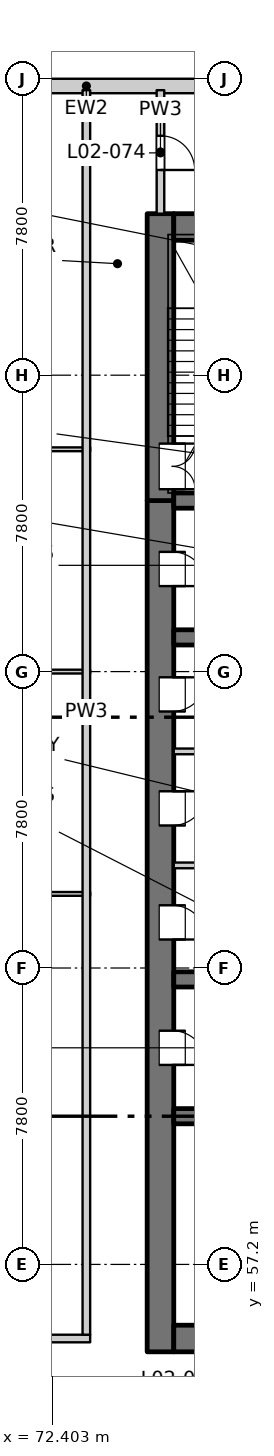
"""IFC4 building model, lengths in metres.
Left out: names, types, materials, properties, quantities, classifications, styles, units other than length and angle.
Written with IfcOpenShell. Run it as: python <this file> out.ifc"""

import sys

from ifc_helpers import new_model, si_unit, direction, frame, frame_2d, origin, place, context, subcontext, project, spatial, rectangle, extrude, element, fill, save


model = new_model("IFC4")
c1 = context("Model", 3, precision=1e-05, world=origin(), true_north=direction((0.0, 1.0)))
c2 = subcontext(c1, "Body", "Model", "MODEL_VIEW")
j1 = project(units=[si_unit("LENGTHUNIT", "METRE"), si_unit("PLANEANGLEUNIT", "RADIAN")], contexts=[c1])
p1 = place(None, origin())
s1 = spatial("IfcSite", under=j1, at=p1, CompositionType="ELEMENT")
p2 = place(p1, origin())
s2 = spatial("IfcBuilding", under=s1, at=p2, CompositionType="ELEMENT")
p3 = place(p2, frame((0.0, 0.0, 10.5)))
s3 = spatial("IfcBuildingStorey", under=s2, at=p3, CompositionType="ELEMENT", Elevation=10.5)
p4 = place(p3, frame((75.25, 54.9, -0.3), z_axis=(0.0, 0.0, 1.0), x_axis=(0.0, 1.0, 0.0)))
e1 = element("IfcWall", 1, at=p4, inside=s3, PredefinedType="SOLIDWALL", context=c2, shape_type="SweptSolid", body=[
    extrude(rectangle(XDim=22.4, YDim=0.7, at=frame_2d((11.2, 0.0))), origin(), (0.0, 0.0, 1.0), 4.45),
])
p5 = place(p4, frame((7.55, 0.0, 0.3)))
e2 = element("IfcOpeningElement", 2, at=p5, cuts=e1, PredefinedType="OPENING", context=c2, shape_type="SweptSolid", body=[
    extrude(rectangle(XDim=0.9, YDim=2.1, at=frame_2d((0.45, 1.05))), frame((0.0, 0.36, 0.0), z_axis=(0.0, -1.0, 0.0), x_axis=(1.0, 0.0, 0.0)), (0.0, 0.0, 1.0), 0.72),
])
p6 = place(p4, frame((10.85, 0.0, 0.3)))
e3 = element("IfcOpeningElement", 3, at=p6, cuts=e1, PredefinedType="OPENING", context=c2, shape_type="SweptSolid", body=[
    extrude(rectangle(XDim=0.9, YDim=2.1, at=frame_2d((0.45, 1.05))), frame((0.0, 0.36, 0.0), z_axis=(0.0, -1.0, 0.0), x_axis=(1.0, 0.0, 0.0)), (0.0, 0.0, 1.0), 0.72),
])
p7 = place(p4, frame((13.85, 0.0, 0.3)))
e4 = element("IfcOpeningElement", 4, at=p7, cuts=e1, PredefinedType="OPENING", context=c2, shape_type="SweptSolid", body=[
    extrude(rectangle(XDim=0.9, YDim=2.1, at=frame_2d((0.45, 1.05))), frame((0.0, 0.36, 0.0), z_axis=(0.0, -1.0, 0.0), x_axis=(1.0, 0.0, 0.0)), (0.0, 0.0, 1.0), 0.72),
])
p8 = place(p4, frame((16.85, 0.0, 0.3)))
e5 = element("IfcOpeningElement", 5, at=p8, cuts=e1, PredefinedType="OPENING", context=c2, shape_type="SweptSolid", body=[
    extrude(rectangle(XDim=0.9, YDim=2.1, at=frame_2d((0.45, 1.05))), frame((0.0, 0.36, 0.0), z_axis=(0.0, -1.0, 0.0), x_axis=(1.0, 0.0, 0.0)), (0.0, 0.0, 1.0), 0.72),
])
p9 = place(p4, frame((20.15, 0.0, 0.3)))
e6 = element("IfcOpeningElement", 6, at=p9, cuts=e1, PredefinedType="OPENING", context=c2, shape_type="SweptSolid", body=[
    extrude(rectangle(XDim=0.9, YDim=2.1, at=frame_2d((0.45, 1.05))), frame((0.0, 0.36, 0.0), z_axis=(0.0, -1.0, 0.0), x_axis=(1.0, 0.0, 0.0)), (0.0, 0.0, 1.0), 0.72),
])
p10 = place(p3, frame((75.25, 77.3, -0.3), z_axis=(0.0, 0.0, 1.0), x_axis=(0.0, 1.0, 0.0)))
e7 = element("IfcWall", 7, at=p10, inside=s3, PredefinedType="SOLIDWALL", context=c2, shape_type="SweptSolid", body=[
    extrude(rectangle(XDim=7.55, YDim=0.7, at=frame_2d((3.775, 0.0))), origin(), (0.0, 0.0, 1.0), 4.45),
])
p11 = place(p10, frame((0.3, 0.0, 0.3)))
e8 = element("IfcOpeningElement", 8, at=p11, cuts=e7, PredefinedType="OPENING", context=c2, shape_type="SweptSolid", body=[
    extrude(rectangle(XDim=1.2, YDim=2.1, at=frame_2d((0.6, 1.05))), frame((0.0, 0.36, 0.0), z_axis=(0.0, -1.0, 0.0), x_axis=(1.0, 0.0, 0.0)), (0.0, 0.0, 1.0), 0.72),
])
p12 = place(p3, frame((75.6, 55.25, -0.3), z_axis=(0.0, 0.0, 1.0), x_axis=(1.0, 0.0, 0.0)))
e9 = element("IfcWall", 9, at=p12, inside=s3, PredefinedType="SOLIDWALL", context=c2, shape_type="SweptSolid", body=[
    extrude(rectangle(XDim=18.8, YDim=0.7, at=frame_2d((9.4, 0.0))), origin(), (0.0, 0.0, 1.0), 4.45),
])
p13 = place(p12, frame((8.65, 0.0, 0.3)))
e10 = element("IfcOpeningElement", 10, at=p13, cuts=e9, PredefinedType="OPENING", context=c2, shape_type="SweptSolid", body=[
    extrude(rectangle(XDim=1.5, YDim=2.1, at=frame_2d((0.75, 1.05))), frame((0.0, 0.36, 0.0), z_axis=(0.0, -1.0, 0.0), x_axis=(1.0, 0.0, 0.0)), (0.0, 0.0, 1.0), 0.72),
])
p14 = place(p3, frame((75.6, 84.5, -0.3), z_axis=(0.0, 0.0, 1.0), x_axis=(1.0, 0.0, 0.0)))
e11 = element("IfcWall", 11, at=p14, inside=s3, PredefinedType="SOLIDWALL", context=c2, shape_type="SweptSolid", body=[
    extrude(rectangle(XDim=18.8, YDim=0.7, at=frame_2d((9.4, 0.0))), origin(), (0.0, 0.0, 1.0), 4.45),
])
for number, where, z_axis, x_axis in (
    (12, (75.6, 61.1, -0.3), (0.0, 0.0, 1.0), (1.0, 0.0, 0.0)),
    (13, (75.6, 64.7, -0.3), (0.0, 0.0, 1.0), (1.0, 0.0, 0.0)),
    (14, (75.6, 73.7, -0.3), (0.0, 0.0, 1.0), (1.0, 0.0, 0.0)),
    (15, (75.6, 77.3, -0.3), (0.0, 0.0, 1.0), (1.0, 0.0, 0.0)),
):
    element("IfcWall", number, at=place(p3, frame(where, z_axis=z_axis, x_axis=x_axis)), inside=s3, PredefinedType="SOLIDWALL", context=c2, shape_type="SweptSolid", body=[
        extrude(rectangle(XDim=3.65, YDim=0.4, at=frame_2d((1.825, 0.0))), origin(), (0.0, 0.0, 1.0), 4.45),
    ])
p15 = place(p3, frame((70.0, 88.21, 0.0), z_axis=(0.0, 0.0, 1.0), x_axis=(1.0, 0.0, 0.0)))
e16 = element("IfcWall", 16, at=p15, inside=s3, PredefinedType="SOLIDWALL", context=c2, shape_type="SweptSolid", body=[
    extrude(rectangle(XDim=6.6, YDim=0.38, at=frame_2d((3.3, 0.0))), origin(), (0.0, 0.0, 1.0), 3.7),
])
p16 = place(p15, frame((0.6, 0.0, 0.9)))
e17 = element("IfcOpeningElement", 17, at=p16, cuts=e16, PredefinedType="OPENING", context=c2, shape_type="SweptSolid", body=[
    extrude(rectangle(XDim=1.5, YDim=1.5, at=frame_2d((0.75, 0.75))), frame((0.0, 0.2, 0.0), z_axis=(0.0, -1.0, 0.0), x_axis=(1.0, 0.0, 0.0)), (0.0, 0.0, 1.0), 0.4),
])
p17 = place(p3, frame((59.55, 55.25, 0.0), z_axis=(0.0, 0.0, 1.0), x_axis=(1.0, 0.0, 0.0)))
e18 = element("IfcWall", 18, at=p17, inside=s3, PredefinedType="PARTITIONING", context=c2, shape_type="SweptSolid", body=[
    extrude(rectangle(XDim=13.85, YDim=0.2, at=frame_2d((6.925, 0.0))), origin(), (0.0, 0.0, 1.0), 4.15),
])
p18 = place(p3, frame((59.55, 66.95, 0.0), z_axis=(0.0, 0.0, 1.0), x_axis=(1.0, 0.0, 0.0)))
e19 = element("IfcWall", 19, at=p18, inside=s3, PredefinedType="PARTITIONING", context=c2, shape_type="SweptSolid", body=[
    extrude(rectangle(XDim=13.85, YDim=0.1, at=frame_2d((6.925, 0.0))), origin(), (0.0, 0.0, 1.0), 4.15),
])
for number, where, z_axis, x_axis in (
    (20, (75.6, 67.7, 0.0), (0.0, 0.0, 1.0), (1.0, 0.0, 0.0)),
    (21, (75.6, 70.7, 0.0), (0.0, 0.0, 1.0), (1.0, 0.0, 0.0)),
):
    element("IfcWall", number, at=place(p3, frame(where, z_axis=z_axis, x_axis=x_axis)), inside=s3, PredefinedType="PARTITIONING", context=c2, shape_type="SweptSolid", body=[
        extrude(rectangle(XDim=3.65, YDim=0.15, at=frame_2d((1.825, 0.0))), origin(), (0.0, 0.0, 1.0), 4.15),
    ])
for number, where, z_axis, x_axis in (
    (22, (59.55, 72.8, 0.0), (0.0, 0.0, 1.0), (1.0, 0.0, 0.0)),
    (23, (59.55, 78.65, 0.0), (0.0, 0.0, 1.0), (1.0, 0.0, 0.0)),
):
    element("IfcWall", number, at=place(p3, frame(where, z_axis=z_axis, x_axis=x_axis)), inside=s3, PredefinedType="PARTITIONING", context=c2, shape_type="SweptSolid", body=[
        extrude(rectangle(XDim=13.85, YDim=0.1, at=frame_2d((6.925, 0.0))), origin(), (0.0, 0.0, 1.0), 4.15),
    ])
p19 = place(p3, frame((73.3, 55.35, 0.0), z_axis=(0.0, 0.0, 1.0), x_axis=(0.0, 1.0, 0.0)))
e24 = element("IfcWall", 24, at=p19, inside=s3, PredefinedType="PARTITIONING", context=c2, shape_type="SweptSolid", body=[
    extrude(rectangle(XDim=32.75, YDim=0.2, at=frame_2d((16.375, 0.0))), origin(), (0.0, 0.0, 1.0), 4.15),
])
p20 = place(p3, frame((75.25, 84.85, 0.0), z_axis=(0.0, 0.0, 1.0), x_axis=(0.0, 1.0, 0.0)))
e25 = element("IfcWall", 25, at=p20, inside=s3, PredefinedType="PARTITIONING", context=c2, shape_type="SweptSolid", body=[
    extrude(rectangle(XDim=3.25, YDim=0.2, at=frame_2d((1.625, 0.0))), origin(), (0.0, 0.0, 1.0), 4.15),
])
p21 = place(p20, frame((1.15, 0.0, 0.0)))
e26 = element("IfcOpeningElement", 26, at=p21, cuts=e25, PredefinedType="OPENING", context=c2, shape_type="SweptSolid", body=[
    extrude(rectangle(XDim=0.9, YDim=2.1, at=frame_2d((0.45, 1.05))), frame((0.0, 0.11, 0.0), z_axis=(0.0, -1.0, 0.0), x_axis=(1.0, 0.0, 0.0)), (0.0, 0.0, 1.0), 0.22),
])
p22 = place(p5, origin())
e27 = element("IfcDoor", 27, at=p22, inside=s3, OperationType="SINGLE_SWING_RIGHT", PredefinedType="DOOR", context=c2, shape_type="SweptSolid", body=[
    extrude(rectangle(XDim=0.9, YDim=2.1, at=frame_2d((0.45, 1.05))), frame((0.0, -0.285, 0.0), z_axis=(0.0, -1.0, 0.0), x_axis=(1.0, 0.0, 0.0)), (0.0, 0.0, 1.0), 0.05),
])
fill(e2, e27)
p23 = place(p6, origin())
e28 = element("IfcDoor", 28, at=p23, inside=s3, OperationType="SINGLE_SWING_RIGHT", PredefinedType="DOOR", context=c2, shape_type="SweptSolid", body=[
    extrude(rectangle(XDim=0.9, YDim=2.1, at=frame_2d((0.45, 1.05))), frame((0.0, -0.285, 0.0), z_axis=(0.0, -1.0, 0.0), x_axis=(1.0, 0.0, 0.0)), (0.0, 0.0, 1.0), 0.05),
])
fill(e3, e28)
p24 = place(p7, origin())
e29 = element("IfcDoor", 29, at=p24, inside=s3, OperationType="SINGLE_SWING_LEFT", PredefinedType="DOOR", context=c2, shape_type="SweptSolid", body=[
    extrude(rectangle(XDim=0.9, YDim=2.1, at=frame_2d((0.45, 1.05))), frame((0.0, -0.285, 0.0), z_axis=(0.0, -1.0, 0.0), x_axis=(1.0, 0.0, 0.0)), (0.0, 0.0, 1.0), 0.05),
])
fill(e4, e29)
p25 = place(p8, origin())
e30 = element("IfcDoor", 30, at=p25, inside=s3, OperationType="SINGLE_SWING_LEFT", PredefinedType="DOOR", context=c2, shape_type="SweptSolid", body=[
    extrude(rectangle(XDim=0.9, YDim=2.1, at=frame_2d((0.45, 1.05))), frame((0.0, -0.285, 0.0), z_axis=(0.0, -1.0, 0.0), x_axis=(1.0, 0.0, 0.0)), (0.0, 0.0, 1.0), 0.05),
])
fill(e5, e30)
p26 = place(p9, origin())
e31 = element("IfcDoor", 31, at=p26, inside=s3, OperationType="SINGLE_SWING_RIGHT", PredefinedType="DOOR", context=c2, shape_type="SweptSolid", body=[
    extrude(rectangle(XDim=0.9, YDim=2.1, at=frame_2d((0.45, 1.05))), frame((0.0, -0.285, 0.0), z_axis=(0.0, -1.0, 0.0), x_axis=(1.0, 0.0, 0.0)), (0.0, 0.0, 1.0), 0.05),
])
fill(e6, e31)
p27 = place(p11, origin())
e32 = element("IfcDoor", 32, at=p27, inside=s3, OperationType="DOUBLE_DOOR_SINGLE_SWING", PredefinedType="DOOR", context=c2, shape_type="SweptSolid", body=[
    extrude(rectangle(XDim=1.2, YDim=2.1, at=frame_2d((0.6, 1.05))), frame((0.0, -0.285, 0.0), z_axis=(0.0, -1.0, 0.0), x_axis=(1.0, 0.0, 0.0)), (0.0, 0.0, 1.0), 0.05),
])
fill(e8, e32)
p28 = place(p21, origin())
e33 = element("IfcDoor", 33, at=p28, inside=s3, OperationType="SINGLE_SWING_RIGHT", PredefinedType="DOOR", context=c2, shape_type="SweptSolid", body=[
    extrude(rectangle(XDim=0.9, YDim=2.1, at=frame_2d((0.45, 1.05))), frame((0.0, 0.025, 0.0), z_axis=(0.0, -1.0, 0.0), x_axis=(1.0, 0.0, 0.0)), (0.0, 0.0, 1.0), 0.05),
])
fill(e26, e33)
save(model, sys.argv[1])
